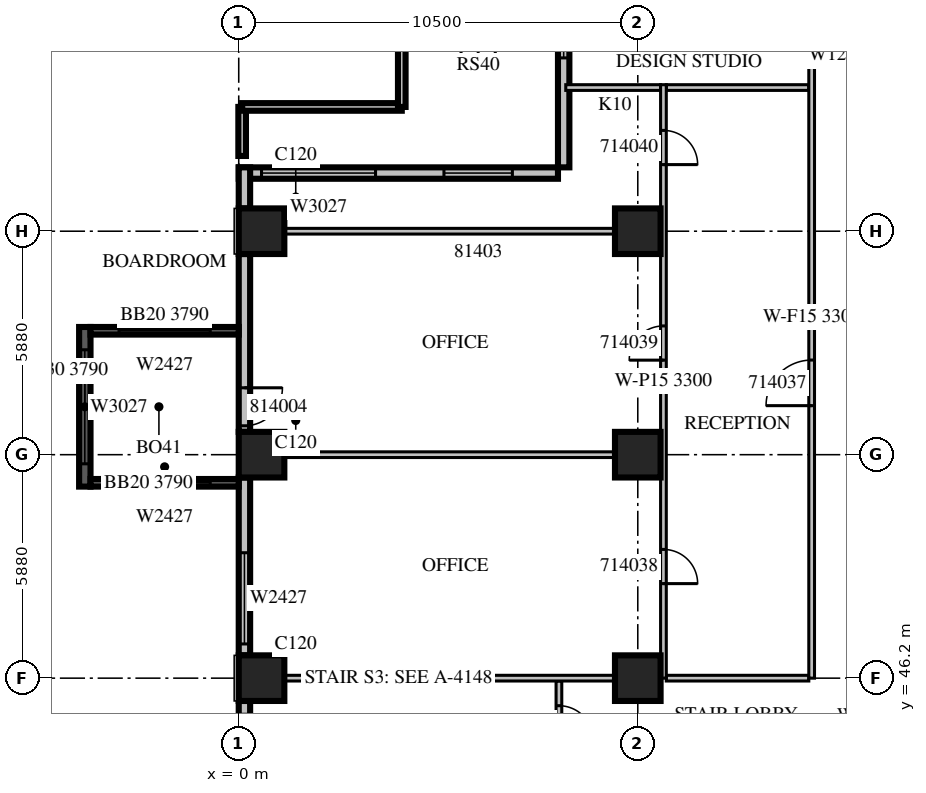
"""IFC4 building model, lengths in metres.
Left out: names, types, materials, properties, quantities, classifications, styles, units other than length and angle.
Written with IfcOpenShell. Run it as: python <this file> out.ifc"""

import sys

from ifc_helpers import new_model, si_unit, direction, frame, frame_2d, origin, origin_2d, place, context, subcontext, project, spatial, rectangle, extrude, source, transform, mapped, element, fill, save


model = new_model("IFC4")
c1 = context("Model", 3, precision=1e-05, world=origin(), true_north=direction((0.0, 1.0)))
c2 = subcontext(c1, "Body", "Model", "MODEL_VIEW")
j1 = project(units=[si_unit("LENGTHUNIT", "METRE"), si_unit("PLANEANGLEUNIT", "RADIAN")], contexts=[c1])
p1 = place(None, origin())
s1 = spatial("IfcSite", under=j1, at=p1, CompositionType="ELEMENT")
p2 = place(p1, origin())
s2 = spatial("IfcBuilding", under=s1, at=p2, CompositionType="ELEMENT")
p3 = place(p2, frame((0.0, 0.0, 69.9)))
s3 = spatial("IfcBuildingStorey", under=s2, at=p3, CompositionType="ELEMENT", Elevation=69.9)
m1 = source(origin(), c2, "Body", "SweptSolid", [
    extrude(rectangle(XDim=1.2, YDim=1.2, at=origin_2d()), origin(), (0.0, 0.0, 1.0), 4.2),
])
for number, where, z_axis, x_axis in (
    (1, (0.6, 46.2, 0.0), (0.0, 0.0, 1.0), (1.0, 0.0, 0.0)),
    (2, (10.5, 46.2, 0.0), (0.0, 0.0, 1.0), (1.0, 0.0, 0.0)),
    (3, (0.6, 52.08, 0.0), (0.0, 0.0, 1.0), (1.0, 0.0, 0.0)),
    (4, (10.5, 52.08, 0.0), (0.0, 0.0, 1.0), (1.0, 0.0, 0.0)),
    (5, (0.6, 57.96, 0.0), (0.0, 0.0, 1.0), (1.0, 0.0, 0.0)),
    (6, (10.5, 57.96, 0.0), (0.0, 0.0, 1.0), (1.0, 0.0, 0.0)),
):
    element("IfcColumn", number, at=place(p3, frame(where, z_axis=z_axis, x_axis=x_axis)), inside=s3, PredefinedType="COLUMN", context=c2, shape_type="MappedRepresentation", body=[
        mapped(m1, transform((0.0, 0.0, 0.0), scale=1.0)),
    ])
m2 = source(origin(), c2, "Body", "SweptSolid", [
    extrude(rectangle(XDim=5.88, YDim=0.3, at=frame_2d((2.94, 0.0))), origin(), (0.0, 0.0, 1.0), 3.8),
])
p4 = place(p3, frame((8.55, 65.52, 0.0), z_axis=(0.0, 0.0, 1.0), x_axis=(0.0, -1.0, 0.0)))
e7 = element("IfcWall", 7, at=p4, inside=s3, PredefinedType="STANDARD", context=c2, shape_type="MappedRepresentation", body=[
    mapped(m2, transform((0.0, 0.0, 0.0), scale=1.0)),
])
m3 = source(origin(), c2, "Body", "SweptSolid", [
    extrude(rectangle(XDim=1.8, YDim=2.4, at=frame_2d((0.9, 1.2))), frame((0.0, 0.16, 0.0), z_axis=(0.0, -1.0, 0.0), x_axis=(1.0, 0.0, 0.0)), (0.0, 0.0, 1.0), 0.32),
])
p5 = place(p4, frame((1.2, 0.0, 0.0)))
e8 = element("IfcOpeningElement", 8, at=p5, cuts=e7, PredefinedType="OPENING", context=c2, shape_type="MappedRepresentation", body=[
    mapped(m3, transform((0.0, 0.0, 0.0), scale=1.0)),
])
p6 = place(p3, frame((8.4, 59.49, 0.0), z_axis=(0.0, 0.0, 1.0), x_axis=(-1.0, 0.0, 0.0)))
e9 = element("IfcWall", 9, at=p6, inside=s3, PredefinedType="STANDARD", context=c2, shape_type="SweptSolid", body=[
    extrude(rectangle(XDim=8.4, YDim=0.3, at=frame_2d((4.2, 0.0))), origin(), (0.0, 0.0, 1.0), 3.8),
])
p7 = place(p6, frame((1.2, 0.0, 0.0)))
e10 = element("IfcOpeningElement", 10, at=p7, cuts=e9, PredefinedType="OPENING", context=c2, shape_type="MappedRepresentation", body=[
    mapped(m3, transform((0.0, 0.0, 0.0), scale=1.0)),
])
m4 = source(origin(), c2, "Body", "SweptSolid", [
    extrude(rectangle(XDim=3.0, YDim=2.7, at=frame_2d((1.5, 1.35))), frame((0.0, 0.16, 0.0), z_axis=(0.0, -1.0, 0.0), x_axis=(1.0, 0.0, 0.0)), (0.0, 0.0, 1.0), 0.32),
])
p8 = place(p6, frame((4.8, 0.0, 0.6)))
e11 = element("IfcOpeningElement", 11, at=p8, cuts=e9, PredefinedType="OPENING", context=c2, shape_type="MappedRepresentation", body=[
    mapped(m4, transform((0.0, 0.0, 0.0), scale=1.0)),
])
m5 = source(origin(), c2, "Body", "SweptSolid", [
    extrude(rectangle(XDim=1.08, YDim=0.3, at=frame_2d((0.54, 0.0))), origin(), (0.0, 0.0, 1.0), 3.8),
])
p9 = place(p3, frame((0.15, 59.64, 0.0), z_axis=(0.0, 0.0, 1.0), x_axis=(0.0, -1.0, 0.0)))
e12 = element("IfcWall", 12, at=p9, inside=s3, PredefinedType="STANDARD", context=c2, shape_type="MappedRepresentation", body=[
    mapped(m5, transform((0.0, 0.0, 0.0), scale=1.0)),
])
m6 = source(origin(), c2, "Body", "SweptSolid", [
    extrude(rectangle(XDim=4.68, YDim=0.3, at=frame_2d((2.34, 0.0))), origin(), (0.0, 0.0, 1.0), 3.8),
])
p10 = place(p3, frame((0.15, 57.36, 0.0), z_axis=(0.0, 0.0, 1.0), x_axis=(0.0, -1.0, 0.0)))
e13 = element("IfcWall", 13, at=p10, inside=s3, PredefinedType="STANDARD", context=c2, shape_type="MappedRepresentation", body=[
    mapped(m6, transform((0.0, 0.0, 0.0), scale=1.0)),
])
m7 = source(origin(), c2, "Body", "SweptSolid", [
    extrude(rectangle(XDim=1.0, YDim=2.1, at=frame_2d((0.5, 1.05))), frame((0.0, 0.16, 0.0), z_axis=(0.0, -1.0, 0.0), x_axis=(1.0, 0.0, 0.0)), (0.0, 0.0, 1.0), 0.32),
])
p11 = place(p10, frame((3.52, 0.0, 0.0)))
e14 = element("IfcOpeningElement", 14, at=p11, cuts=e13, PredefinedType="OPENING", context=c2, shape_type="MappedRepresentation", body=[
    mapped(m7, transform((0.0, 0.0, 0.0), scale=1.0)),
])
p12 = place(p3, frame((0.15, 51.48, 0.0), z_axis=(0.0, 0.0, 1.0), x_axis=(0.0, -1.0, 0.0)))
e15 = element("IfcWall", 15, at=p12, inside=s3, PredefinedType="STANDARD", context=c2, shape_type="MappedRepresentation", body=[
    mapped(m6, transform((0.0, 0.0, 0.0), scale=1.0)),
])
m8 = source(origin(), c2, "Body", "SweptSolid", [
    extrude(rectangle(XDim=2.4, YDim=2.7, at=frame_2d((1.2, 1.35))), frame((0.0, 0.16, 0.0), z_axis=(0.0, -1.0, 0.0), x_axis=(1.0, 0.0, 0.0)), (0.0, 0.0, 1.0), 0.32),
])
p13 = place(p12, frame((1.98, 0.0, 0.6)))
e16 = element("IfcOpeningElement", 16, at=p13, cuts=e15, PredefinedType="OPENING", context=c2, shape_type="MappedRepresentation", body=[
    mapped(m8, transform((0.0, 0.0, 0.0), scale=1.0)),
])
m9 = source(origin(), c2, "Body", "SweptSolid", [
    extrude(rectangle(XDim=1.6, YDim=0.3, at=frame_2d((0.8, 0.0))), origin(), (0.0, 0.0, 1.0), 3.8),
])
p14 = place(p3, frame((0.15, 45.6, 0.0), z_axis=(0.0, 0.0, 1.0), x_axis=(0.0, -1.0, 0.0)))
e17 = element("IfcWall", 17, at=p14, inside=s3, PredefinedType="STANDARD", context=c2, shape_type="MappedRepresentation", body=[
    mapped(m9, transform((0.0, 0.0, 0.0), scale=1.0)),
])
m10 = source(origin(), c2, "Body", "SweptSolid", [
    extrude(rectangle(XDim=0.9, YDim=2.7, at=frame_2d((0.45, 1.35))), frame((0.0, 0.16, 0.0), z_axis=(0.0, -1.0, 0.0), x_axis=(1.0, 0.0, 0.0)), (0.0, 0.0, 1.0), 0.32),
])
p15 = place(p14, frame((0.35, 0.0, 0.6)))
e18 = element("IfcOpeningElement", 18, at=p15, cuts=e17, PredefinedType="OPENING", context=c2, shape_type="MappedRepresentation", body=[
    mapped(m10, transform((0.0, 0.0, 0.0), scale=1.0)),
])
m11 = source(origin(), c2, "Body", "SweptSolid", [
    extrude(rectangle(XDim=4.2, YDim=0.3, at=frame_2d((2.1, 0.0))), origin(), (0.0, 0.0, 1.0), 3.79),
])
p16 = place(p3, frame((-4.05, 55.44, 0.0), z_axis=(0.0, 0.0, 1.0), x_axis=(0.0, -1.0, 0.0)))
e19 = element("IfcWall", 19, at=p16, inside=s3, PredefinedType="SOLIDWALL", context=c2, shape_type="MappedRepresentation", body=[
    mapped(m11, transform((0.0, 0.0, 0.0), scale=1.0)),
])
p17 = place(p16, frame((0.6, 0.0, 0.6)))
e20 = element("IfcOpeningElement", 20, at=p17, cuts=e19, PredefinedType="OPENING", context=c2, shape_type="MappedRepresentation", body=[
    mapped(m4, transform((0.0, 0.0, 0.0), scale=1.0)),
])
m12 = source(origin(), c2, "Body", "SweptSolid", [
    extrude(rectangle(XDim=3.9, YDim=0.2, at=frame_2d((1.95, 0.0))), origin(), (0.0, 0.0, 1.0), 3.79),
])
p18 = place(p3, frame((0.0, 55.34, 0.0), z_axis=(0.0, 0.0, 1.0), x_axis=(-1.0, 0.0, 0.0)))
e21 = element("IfcWall", 21, at=p18, inside=s3, PredefinedType="SOLIDWALL", context=c2, shape_type="MappedRepresentation", body=[
    mapped(m12, transform((0.0, 0.0, 0.0), scale=1.0)),
])
m13 = source(origin(), c2, "Body", "SweptSolid", [
    extrude(rectangle(XDim=2.4, YDim=2.7, at=frame_2d((1.2, 1.35))), frame((0.0, 0.11, 0.0), z_axis=(0.0, -1.0, 0.0), x_axis=(1.0, 0.0, 0.0)), (0.0, 0.0, 1.0), 0.22),
])
p19 = place(p18, frame((0.75, 0.0, 0.6)))
e22 = element("IfcOpeningElement", 22, at=p19, cuts=e21, PredefinedType="OPENING", context=c2, shape_type="MappedRepresentation", body=[
    mapped(m13, transform((0.0, 0.0, 0.0), scale=1.0)),
])
p20 = place(p3, frame((0.0, 51.34, 0.0), z_axis=(0.0, 0.0, 1.0), x_axis=(-1.0, 0.0, 0.0)))
e23 = element("IfcWall", 23, at=p20, inside=s3, PredefinedType="SOLIDWALL", context=c2, shape_type="MappedRepresentation", body=[
    mapped(m12, transform((0.0, 0.0, 0.0), scale=1.0)),
])
p21 = place(p20, frame((0.75, 0.0, 0.6)))
e24 = element("IfcOpeningElement", 24, at=p21, cuts=e23, PredefinedType="OPENING", context=c2, shape_type="MappedRepresentation", body=[
    mapped(m13, transform((0.0, 0.0, 0.0), scale=1.0)),
])
p22 = place(p3, frame((0.09, 59.94, 0.0), z_axis=(0.0, 0.0, 1.0), x_axis=(0.0, 1.0, 0.0)))
e25 = element("IfcWall", 25, at=p22, inside=s3, PredefinedType="PARAPET", context=c2, shape_type="SweptSolid", body=[
    extrude(rectangle(XDim=1.29, YDim=0.2, at=frame_2d((0.645, 0.0))), origin(), (0.0, 0.0, 1.0), 1.1),
])
p23 = place(p3, frame((0.09, 61.23, 0.0), z_axis=(0.0, 0.0, 1.0), x_axis=(1.0, 0.0, 0.0)))
e26 = element("IfcWall", 26, at=p23, inside=s3, PredefinedType="PARAPET", context=c2, shape_type="SweptSolid", body=[
    extrude(rectangle(XDim=4.2, YDim=0.2, at=frame_2d((2.1, 0.0))), origin(), (0.0, 0.0, 1.0), 1.1),
])
m14 = source(origin(), c2, "Body", "SweptSolid", [
    extrude(rectangle(XDim=4.2, YDim=0.2, at=frame_2d((2.1, 0.0))), origin(), (0.0, 0.0, 1.0), 1.1),
])
p24 = place(p3, frame((4.29, 61.23, 0.0), z_axis=(0.0, 0.0, 1.0), x_axis=(0.0, 1.0, 0.0)))
e27 = element("IfcWall", 27, at=p24, inside=s3, PredefinedType="PARAPET", context=c2, shape_type="MappedRepresentation", body=[
    mapped(m14, transform((0.0, 0.0, 0.0), scale=1.0)),
])
m15 = source(origin(), c2, "Body", "SweptSolid", [
    extrude(rectangle(XDim=2.2, YDim=0.15, at=frame_2d((1.1, 0.0))), origin(), (0.0, 0.0, 1.0), 3.8),
])
p25 = place(p3, frame((8.425, 43.925, 0.0), z_axis=(0.0, 0.0, 1.0), x_axis=(0.0, 1.0, 0.0)))
e28 = element("IfcWall", 28, at=p25, inside=s3, PredefinedType="PARTITIONING", context=c2, shape_type="MappedRepresentation", body=[
    mapped(m15, transform((0.0, 0.0, 0.0), scale=1.0)),
])
m16 = source(origin(), c2, "Body", "SweptSolid", [
    extrude(rectangle(XDim=0.9, YDim=2.1, at=frame_2d((0.45, 1.05))), frame((0.0, 0.085, 0.0), z_axis=(0.0, -1.0, 0.0), x_axis=(1.0, 0.0, 0.0)), (0.0, 0.0, 1.0), 0.17),
])
p26 = place(p25, frame((0.65, 0.0, 0.0)))
e29 = element("IfcOpeningElement", 29, at=p26, cuts=e28, PredefinedType="OPENING", context=c2, shape_type="MappedRepresentation", body=[
    mapped(m16, transform((0.0, 0.0, 0.0), scale=1.0)),
])
m17 = source(origin(), c2, "Body", "SweptSolid", [
    extrude(rectangle(XDim=8.702, YDim=0.15, at=frame_2d((4.351, 0.0))), origin(), (0.0, 0.0, 1.0), 3.8),
])
for number, where, z_axis, x_axis in (
    (30, (9.901, 52.08, 0.0), (0.0, 0.0, 1.0), (-1.0, 0.0, 0.0)),
    (31, (9.901, 57.96, 0.0), (0.0, 0.0, 1.0), (-1.0, 0.0, 0.0)),
    (32, (9.901, 46.2, 0.0), (0.0, 0.0, 1.0), (-1.0, 0.0, 0.0)),
):
    element("IfcWall", number, at=place(p3, frame(where, z_axis=z_axis, x_axis=x_axis)), inside=s3, PredefinedType="PARTITIONING", context=c2, shape_type="MappedRepresentation", body=[
        mapped(m17, transform((0.0, 0.0, 0.0), scale=1.0)),
    ])
m18 = source(origin(), c2, "Body", "SweptSolid", [
    extrude(rectangle(XDim=3.75, YDim=0.15, at=frame_2d((1.875, 0.0))), origin(), (0.0, 0.0, 1.0), 3.8),
])
p27 = place(p3, frame((15.0, 46.2, 0.0), z_axis=(0.0, 0.0, 1.0), x_axis=(-1.0, 0.0, 0.0)))
e33 = element("IfcWall", 33, at=p27, inside=s3, PredefinedType="PARTITIONING", context=c2, shape_type="MappedRepresentation", body=[
    mapped(m18, transform((0.0, 0.0, 0.0), scale=1.0)),
])
p28 = place(p3, frame((11.1, 61.74, 0.0), z_axis=(0.0, 0.0, 1.0), x_axis=(-1.0, 0.0, 0.0)))
e34 = element("IfcWall", 34, at=p28, inside=s3, PredefinedType="PARTITIONING", context=c2, shape_type="SweptSolid", body=[
    extrude(rectangle(XDim=2.495, YDim=0.15, at=frame_2d((1.248, 0.0))), origin(), (0.0, 0.0, 1.0), 3.8),
])
p29 = place(p3, frame((15.0, 61.74, 0.0), z_axis=(0.0, 0.0, 1.0), x_axis=(-1.0, 0.0, 0.0)))
e35 = element("IfcWall", 35, at=p29, inside=s3, PredefinedType="PARTITIONING", context=c2, shape_type="MappedRepresentation", body=[
    mapped(m18, transform((0.0, 0.0, 0.0), scale=1.0)),
])
p30 = place(p3, frame((11.175, 46.2, 0.0), z_axis=(0.0, 0.0, 1.0), x_axis=(0.0, 1.0, 0.0)))
e36 = element("IfcWall", 36, at=p30, inside=s3, PredefinedType="PARTITIONING", context=c2, shape_type="SweptSolid", body=[
    extrude(rectangle(XDim=15.615, YDim=0.15, at=frame_2d((7.808, 0.0))), origin(), (0.0, 0.0, 1.0), 3.3),
])
p31 = place(p30, frame((2.487, 0.0, 0.0)))
e37 = element("IfcOpeningElement", 37, at=p31, cuts=e36, PredefinedType="OPENING", context=c2, shape_type="MappedRepresentation", body=[
    mapped(m16, transform((0.0, 0.0, 0.0), scale=1.0)),
])
p32 = place(p30, frame((8.367, 0.0, 0.0)))
e38 = element("IfcOpeningElement", 38, at=p32, cuts=e36, PredefinedType="OPENING", context=c2, shape_type="MappedRepresentation", body=[
    mapped(m16, transform((0.0, 0.0, 0.0), scale=1.0)),
])
p33 = place(p30, frame((13.512, 0.0, 0.0)))
e39 = element("IfcOpeningElement", 39, at=p33, cuts=e36, PredefinedType="OPENING", context=c2, shape_type="MappedRepresentation", body=[
    mapped(m16, transform((0.0, 0.0, 0.0), scale=1.0)),
])
m19 = source(origin(), c2, "Body", "SweptSolid", [
    extrude(rectangle(XDim=19.02, YDim=0.15, at=frame_2d((9.51, 0.0))), origin(), (0.0, 0.0, 1.0), 3.3),
])
p34 = place(p3, frame((15.075, 46.2, 0.0), z_axis=(0.0, 0.0, 1.0), x_axis=(0.0, 1.0, 0.0)))
e40 = element("IfcWall", 40, at=p34, inside=s3, PredefinedType="PARTITIONING", context=c2, shape_type="MappedRepresentation", body=[
    mapped(m19, transform((0.0, 0.0, 0.0), scale=1.0)),
])
m20 = source(origin(), c2, "Body", "SweptSolid", [
    extrude(rectangle(XDim=1.2, YDim=2.1, at=frame_2d((0.6, 1.05))), frame((0.0, 0.085, 0.0), z_axis=(0.0, -1.0, 0.0), x_axis=(1.0, 0.0, 0.0)), (0.0, 0.0, 1.0), 0.17),
])
p35 = place(p34, frame((7.17, 0.0, 0.0)))
e41 = element("IfcOpeningElement", 41, at=p35, cuts=e40, PredefinedType="OPENING", context=c2, shape_type="MappedRepresentation", body=[
    mapped(m20, transform((0.0, 0.0, 0.0), scale=1.0)),
])
m21 = source(origin(), c2, "Body", "SweptSolid", [
    extrude(rectangle(XDim=1.1, YDim=2.1, at=frame_2d((0.55, 1.05))), frame((0.0, 0.085, 0.0), z_axis=(0.0, -1.0, 0.0), x_axis=(1.0, 0.0, 0.0)), (0.0, 0.0, 1.0), 0.17),
])
p36 = place(p34, frame((16.767, 0.0, 0.0)))
e42 = element("IfcOpeningElement", 42, at=p36, cuts=e40, PredefinedType="OPENING", context=c2, shape_type="MappedRepresentation", body=[
    mapped(m21, transform((0.0, 0.0, 0.0), scale=1.0)),
])
m22 = source(origin(), c2, "Body", "SweptSolid", [
    extrude(rectangle(XDim=1.8, YDim=2.4, at=frame_2d((0.9, 1.2))), frame((0.0, 0.025, 0.0), z_axis=(0.0, -1.0, 0.0), x_axis=(1.0, 0.0, 0.0)), (0.0, 0.0, 1.0), 0.05),
])
p37 = place(p5, origin())
e43 = element("IfcDoor", 43, at=p37, inside=s3, OperationType="SLIDING_TO_LEFT", PredefinedType="DOOR", context=c2, shape_type="MappedRepresentation", body=[
    mapped(m22, transform((0.0, 0.0, 0.0), scale=1.0)),
])
fill(e8, e43)
p38 = place(p7, origin())
e44 = element("IfcDoor", 44, at=p38, inside=s3, OperationType="SLIDING_TO_LEFT", PredefinedType="DOOR", context=c2, shape_type="MappedRepresentation", body=[
    mapped(m22, transform((0.0, 0.0, 0.0), scale=1.0)),
])
fill(e10, e44)
m23 = source(origin(), c2, "Body", "SweptSolid", [
    extrude(rectangle(XDim=3.0, YDim=2.7, at=frame_2d((1.5, 1.35))), frame((0.0, 0.03, 0.0), z_axis=(0.0, -1.0, 0.0), x_axis=(1.0, 0.0, 0.0)), (0.0, 0.0, 1.0), 0.06),
])
p39 = place(p8, origin())
e45 = element("IfcWindow", 45, at=p39, inside=s3, PartitioningType="SINGLE_PANEL", PredefinedType="WINDOW", context=c2, shape_type="MappedRepresentation", body=[
    mapped(m23, transform((0.0, 0.0, 0.0), scale=1.0)),
])
fill(e11, e45)
m24 = source(origin(), c2, "Body", "SweptSolid", [
    extrude(rectangle(XDim=2.4, YDim=2.7, at=frame_2d((1.2, 1.35))), frame((0.0, 0.03, 0.0), z_axis=(0.0, -1.0, 0.0), x_axis=(1.0, 0.0, 0.0)), (0.0, 0.0, 1.0), 0.06),
])
p40 = place(p13, origin())
e46 = element("IfcWindow", 46, at=p40, inside=s3, PartitioningType="SINGLE_PANEL", PredefinedType="WINDOW", context=c2, shape_type="MappedRepresentation", body=[
    mapped(m24, transform((0.0, 0.0, 0.0), scale=1.0)),
])
fill(e16, e46)
p41 = place(p17, origin())
e47 = element("IfcWindow", 47, at=p41, inside=s3, PartitioningType="SINGLE_PANEL", PredefinedType="WINDOW", context=c2, shape_type="MappedRepresentation", body=[
    mapped(m23, transform((0.0, 0.0, 0.0), scale=1.0)),
])
fill(e20, e47)
p42 = place(p19, origin())
e48 = element("IfcWindow", 48, at=p42, inside=s3, PartitioningType="SINGLE_PANEL", PredefinedType="WINDOW", context=c2, shape_type="MappedRepresentation", body=[
    mapped(m24, transform((0.0, 0.0, 0.0), scale=1.0)),
])
fill(e22, e48)
p43 = place(p21, origin())
e49 = element("IfcWindow", 49, at=p43, inside=s3, PartitioningType="SINGLE_PANEL", PredefinedType="WINDOW", context=c2, shape_type="MappedRepresentation", body=[
    mapped(m24, transform((0.0, 0.0, 0.0), scale=1.0)),
])
fill(e24, e49)
m25 = source(origin(), c2, "Body", "SweptSolid", [
    extrude(rectangle(XDim=0.9, YDim=0.9, at=origin_2d()), origin(), (0.0, 0.0, 1.0), 0.05),
])
p44 = place(p3, frame((0.0, 0.0, -0.4)))
p45 = place(p44, frame((6.3, 62.67, 0.0)))
p46 = place(p45, frame((0.0, 0.0, 0.35)))
e50 = element("IfcWindow", 50, at=p46, inside=s3, PartitioningType="SINGLE_PANEL", PredefinedType="SKYLIGHT", context=c2, shape_type="MappedRepresentation", body=[
    mapped(m25, transform((0.0, 0.0, 0.0), scale=1.0)),
])
m26 = source(origin(), c2, "Body", "SweptSolid", [
    extrude(rectangle(XDim=0.9, YDim=2.1, at=frame_2d((0.45, 1.05))), frame((0.0, 0.025, 0.0), z_axis=(0.0, -1.0, 0.0), x_axis=(1.0, 0.0, 0.0)), (0.0, 0.0, 1.0), 0.05),
])
p47 = place(p26, origin())
e51 = element("IfcDoor", 51, at=p47, inside=s3, OperationType="SINGLE_SWING_RIGHT", PredefinedType="DOOR", context=c2, shape_type="MappedRepresentation", body=[
    mapped(m26, transform((0.0, 0.0, 0.0), scale=1.0)),
])
fill(e29, e51)
m27 = source(origin(), c2, "Body", "SweptSolid", [
    extrude(rectangle(XDim=1.2, YDim=2.1, at=frame_2d((0.6, 1.05))), frame((0.0, 0.025, 0.0), z_axis=(0.0, -1.0, 0.0), x_axis=(1.0, 0.0, 0.0)), (0.0, 0.0, 1.0), 0.05),
])
p48 = place(p35, origin())
e52 = element("IfcDoor", 52, at=p48, inside=s3, OperationType="SINGLE_SWING_LEFT", PredefinedType="DOOR", context=c2, shape_type="MappedRepresentation", body=[
    mapped(m27, transform((0.0, 0.0, 0.0), scale=1.0)),
])
fill(e41, e52)
p49 = place(p31, origin())
e53 = element("IfcDoor", 53, at=p49, inside=s3, OperationType="SINGLE_SWING_RIGHT", PredefinedType="DOOR", context=c2, shape_type="MappedRepresentation", body=[
    mapped(m26, transform((0.0, 0.0, 0.0), scale=1.0)),
])
fill(e37, e53)
p50 = place(p32, origin())
e54 = element("IfcDoor", 54, at=p50, inside=s3, OperationType="SINGLE_SWING_LEFT", PredefinedType="DOOR", context=c2, shape_type="MappedRepresentation", body=[
    mapped(m26, transform((0.0, 0.0, 0.0), scale=1.0)),
])
fill(e38, e54)
p51 = place(p33, origin())
e55 = element("IfcDoor", 55, at=p51, inside=s3, OperationType="SINGLE_SWING_RIGHT", PredefinedType="DOOR", context=c2, shape_type="MappedRepresentation", body=[
    mapped(m26, transform((0.0, 0.0, 0.0), scale=1.0)),
])
fill(e39, e55)
m28 = source(origin(), c2, "Body", "SweptSolid", [
    extrude(rectangle(XDim=1.0, YDim=2.1, at=frame_2d((0.5, 1.05))), frame((0.0, 0.025, 0.0), z_axis=(0.0, -1.0, 0.0), x_axis=(1.0, 0.0, 0.0)), (0.0, 0.0, 1.0), 0.05),
])
p52 = place(p11, origin())
e56 = element("IfcDoor", 56, at=p52, inside=s3, OperationType="SINGLE_SWING_LEFT", PredefinedType="DOOR", context=c2, shape_type="MappedRepresentation", body=[
    mapped(m28, transform((0.0, 0.0, 0.0), scale=1.0)),
])
fill(e14, e56)
save(model, sys.argv[1])
